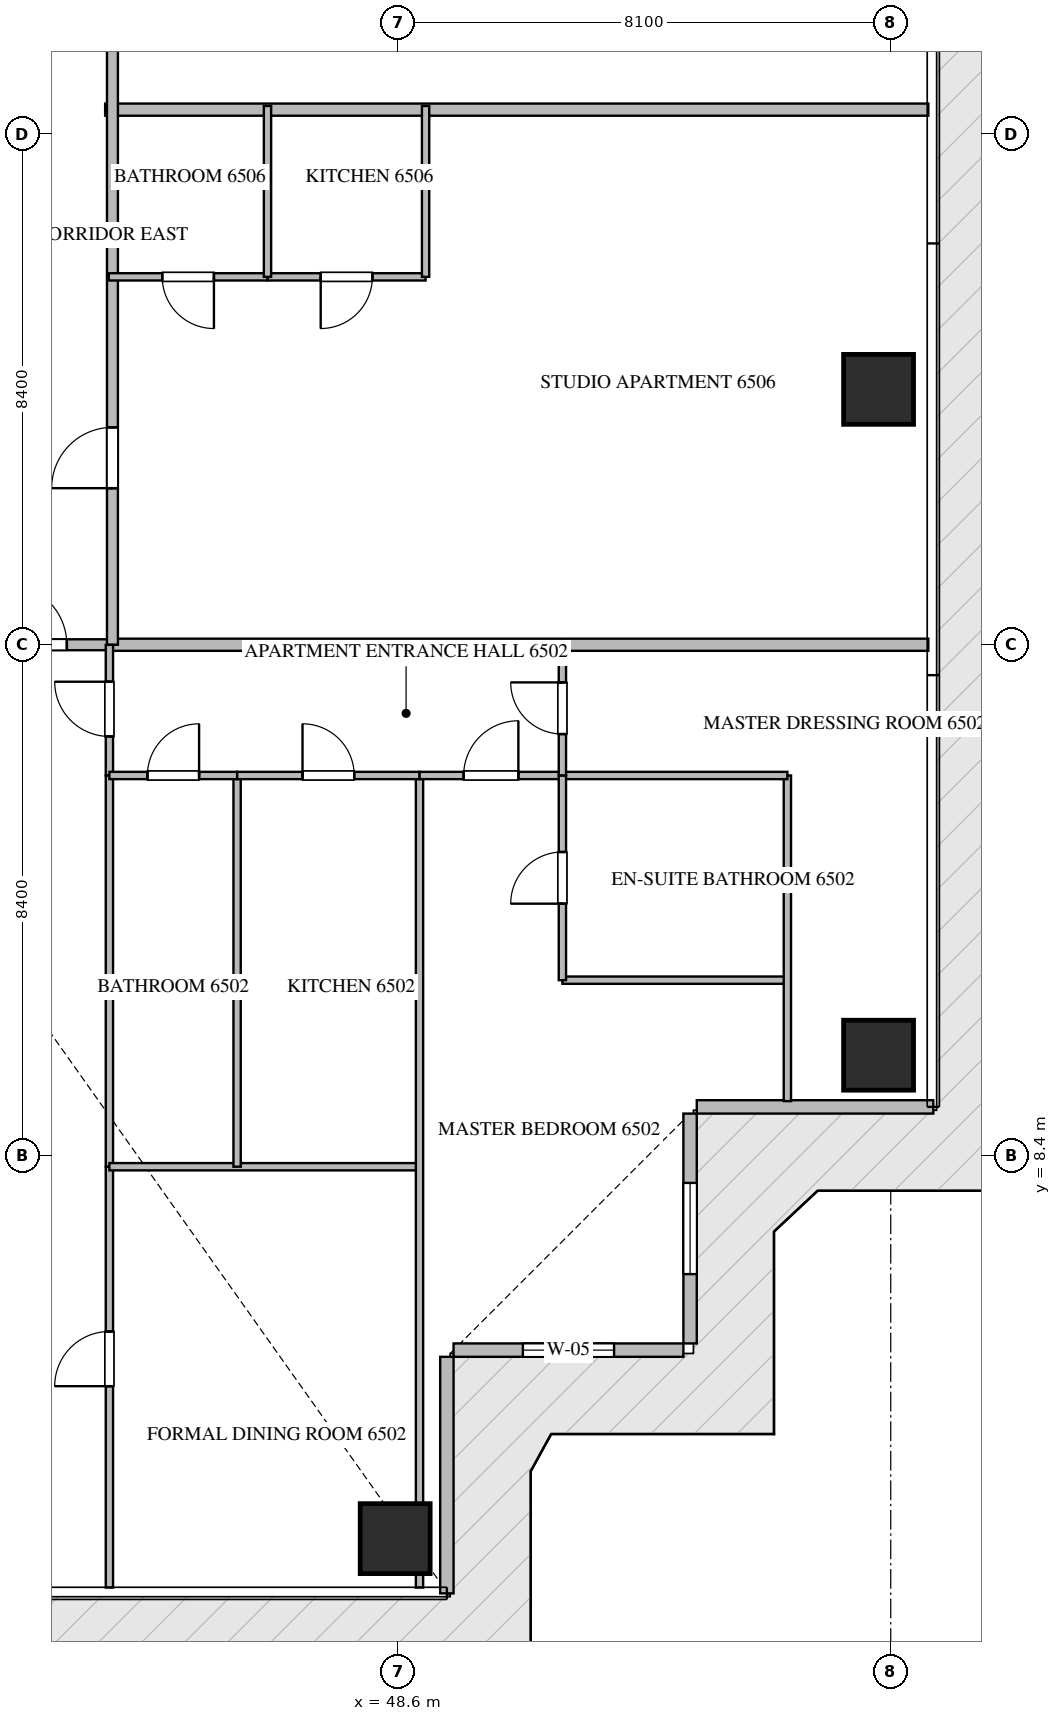
"""IFC4 building model, lengths in metres.
Left out: names, types, materials, properties, quantities, classifications, styles, units other than length and angle.
Written with IfcOpenShell. Run it as: python <this file> out.ifc"""

import sys

from ifc_helpers import new_model, si_unit, direction, frame, frame_2d, origin, origin_2d, place, context, subcontext, project, spatial, rectangle, extrude, source, transform, mapped, element, fill, save


model = new_model("IFC4")
c1 = context("Model", 3, precision=1e-05, world=origin(), true_north=direction((0.0, 1.0)))
c2 = subcontext(c1, "Body", "Model", "MODEL_VIEW")
j1 = project(units=[si_unit("LENGTHUNIT", "METRE"), si_unit("PLANEANGLEUNIT", "RADIAN")], contexts=[c1])
p1 = place(None, origin())
s1 = spatial("IfcSite", under=j1, at=p1, CompositionType="ELEMENT")
p2 = place(p1, origin())
s2 = spatial("IfcBuilding", under=s1, at=p2, CompositionType="ELEMENT")
p3 = place(p2, frame((0.0, 0.0, 260.5)))
s3 = spatial("IfcBuildingStorey", under=s2, at=p3, CompositionType="ELEMENT", Elevation=260.5)
m1 = source(origin(), c2, "Body", "SweptSolid", [
    extrude(rectangle(XDim=1.15, YDim=1.15, at=origin_2d()), origin(), (0.0, 0.0, 1.0), 3.85),
])
for number, where, z_axis, x_axis in (
    (1, (48.55, 2.1, -0.26), (0.0, 0.0, 1.0), (1.0, 0.0, 0.0)),
    (2, (56.5, 10.05, -0.26), (0.0, 0.0, 1.0), (1.0, 0.0, 0.0)),
    (3, (56.5, 21.0, -0.26), (0.0, 0.0, 1.0), (1.0, 0.0, 0.0)),
):
    element("IfcColumn", number, at=place(p3, frame(where, z_axis=z_axis, x_axis=x_axis)), inside=s3, PredefinedType="COLUMN", context=c2, shape_type="MappedRepresentation", body=[
        mapped(m1, transform((0.0, 0.0, 0.0), scale=1.0)),
    ])
p4 = place(p3, frame((49.4, 1.2, 0.0), z_axis=(0.0, 0.0, 1.0), x_axis=(0.0, 1.0, 0.0)))
e4 = element("IfcWall", 4, at=p4, inside=s3, PredefinedType="ELEMENTEDWALL", context=c2, shape_type="SweptSolid", body=[
    extrude(rectangle(XDim=3.89, YDim=0.22, at=frame_2d((1.945, 0.0))), origin(), (0.0, 0.0, 1.0), 3.575),
])
p5 = place(p3, frame((49.51, 5.2, 0.0), z_axis=(0.0, 0.0, 1.0), x_axis=(1.0, 0.0, 0.0)))
e5 = element("IfcWall", 5, at=p5, inside=s3, PredefinedType="ELEMENTEDWALL", context=c2, shape_type="SweptSolid", body=[
    extrude(rectangle(XDim=3.78, YDim=0.22, at=frame_2d((1.89, 0.0))), origin(), (0.0, 0.0, 1.0), 3.575),
])
p6 = place(p5, frame((1.14, 0.0, 0.65)))
e6 = element("IfcOpeningElement", 6, at=p6, cuts=e5, PredefinedType="OPENING", context=c2, shape_type="SweptSolid", body=[
    extrude(rectangle(XDim=1.5, YDim=2.25, at=frame_2d((0.75, 1.125))), frame((0.0, 0.12, 0.0), z_axis=(0.0, -1.0, 0.0), x_axis=(1.0, 0.0, 0.0)), (0.0, 0.0, 1.0), 0.24),
])
p7 = place(p3, frame((53.4, 5.31, 0.0), z_axis=(0.0, 0.0, 1.0), x_axis=(0.0, 1.0, 0.0)))
e7 = element("IfcWall", 7, at=p7, inside=s3, PredefinedType="ELEMENTEDWALL", context=c2, shape_type="SweptSolid", body=[
    extrude(rectangle(XDim=3.78, YDim=0.22, at=frame_2d((1.89, 0.0))), origin(), (0.0, 0.0, 1.0), 3.575),
])
p8 = place(p7, frame((1.14, 0.0, 0.65)))
e8 = element("IfcOpeningElement", 8, at=p8, cuts=e7, PredefinedType="OPENING", context=c2, shape_type="SweptSolid", body=[
    extrude(rectangle(XDim=1.5, YDim=2.25, at=frame_2d((0.75, 1.125))), frame((0.0, 0.12, 0.0), z_axis=(0.0, -1.0, 0.0), x_axis=(1.0, 0.0, 0.0)), (0.0, 0.0, 1.0), 0.24),
])
p9 = place(p3, frame((53.51, 9.2, 0.0), z_axis=(0.0, 0.0, 1.0), x_axis=(1.0, 0.0, 0.0)))
e9 = element("IfcWall", 9, at=p9, inside=s3, PredefinedType="ELEMENTEDWALL", context=c2, shape_type="SweptSolid", body=[
    extrude(rectangle(XDim=3.89, YDim=0.22, at=frame_2d((1.945, 0.0))), origin(), (0.0, 0.0, 1.0), 3.575),
])
p10 = place(p3, frame((43.78, 25.6, 0.0), z_axis=(0.0, 0.0, 1.0), x_axis=(1.0, 0.0, 0.0)))
e10 = element("IfcWall", 10, at=p10, inside=s3, PredefinedType="PARTITIONING", context=c2, shape_type="SweptSolid", body=[
    extrude(rectangle(XDim=13.538, YDim=0.2, at=frame_2d((6.769, 0.0))), origin(), (0.0, 0.0, 1.0), 3.59),
])
p11 = place(p3, frame((43.9, 16.8, 0.0), z_axis=(0.0, 0.0, 1.0), x_axis=(1.0, 0.0, 0.0)))
e11 = element("IfcWall", 11, at=p11, inside=s3, PredefinedType="PARTITIONING", context=c2, shape_type="SweptSolid", body=[
    extrude(rectangle(XDim=13.418, YDim=0.2, at=frame_2d((6.709, 0.0))), origin(), (0.0, 0.0, 1.0), 3.59),
])
p12 = place(p3, frame((41.402, 16.8, 0.0), z_axis=(0.0, 0.0, 1.0), x_axis=(1.0, 0.0, 0.0)))
e12 = element("IfcWall", 12, at=p12, inside=s3, PredefinedType="PARTITIONING", context=c2, shape_type="SweptSolid", body=[
    extrude(rectangle(XDim=2.496, YDim=0.18, at=frame_2d((1.248, 0.0))), origin(), (0.0, 0.0, 1.0), 3.59),
])
p13 = place(p12, frame((0.748, 0.0, 0.0)))
e13 = element("IfcOpeningElement", 13, at=p13, cuts=e12, PredefinedType="OPENING", context=c2, shape_type="SweptSolid", body=[
    extrude(rectangle(XDim=1.0, YDim=2.15, at=frame_2d((0.5, 1.075))), frame((0.0, 0.1, 0.0), z_axis=(0.0, -1.0, 0.0), x_axis=(1.0, 0.0, 0.0)), (0.0, 0.0, 1.0), 0.2),
])
p14 = place(p3, frame((43.9, 16.8, 0.0), z_axis=(0.0, 0.0, 1.0), x_axis=(0.0, 1.0, 0.0)))
e14 = element("IfcWall", 14, at=p14, inside=s3, PredefinedType="PARTITIONING", context=c2, shape_type="SweptSolid", body=[
    extrude(rectangle(XDim=16.8, YDim=0.18, at=frame_2d((8.4, 0.0))), origin(), (0.0, 0.0, 1.0), 3.59),
])
p15 = place(p14, frame((2.575, 0.0, 0.0)))
e15 = element("IfcOpeningElement", 15, at=p15, cuts=e14, PredefinedType="OPENING", context=c2, shape_type="SweptSolid", body=[
    extrude(rectangle(XDim=1.0, YDim=2.15, at=frame_2d((0.5, 1.075))), frame((0.0, 0.1, 0.0), z_axis=(0.0, -1.0, 0.0), x_axis=(1.0, 0.0, 0.0)), (0.0, 0.0, 1.0), 0.2),
])
p16 = place(p14, frame((10.997, 0.0, 0.0)))
e16 = element("IfcOpeningElement", 16, at=p16, cuts=e14, PredefinedType="OPENING", context=c2, shape_type="SweptSolid", body=[
    extrude(rectangle(XDim=1.0, YDim=2.15, at=frame_2d((0.5, 1.075))), frame((0.0, 0.1, 0.0), z_axis=(0.0, -1.0, 0.0), x_axis=(1.0, 0.0, 0.0)), (0.0, 0.0, 1.0), 0.2),
])
p17 = place(p3, frame((43.85, 14.65, 0.0), z_axis=(0.0, 0.0, 1.0), x_axis=(0.0, 1.0, 0.0)))
e17 = element("IfcWall", 17, at=p17, inside=s3, PredefinedType="PARTITIONING", context=c2, shape_type="SweptSolid", body=[
    extrude(rectangle(XDim=2.148, YDim=0.12, at=frame_2d((1.074, 0.0))), origin(), (0.0, 0.0, 1.0), 3.59),
])
p18 = place(p17, frame((0.642, 0.0, 0.0)))
e18 = element("IfcOpeningElement", 18, at=p18, cuts=e17, PredefinedType="OPENING", context=c2, shape_type="SweptSolid", body=[
    extrude(rectangle(XDim=0.9, YDim=2.1, at=frame_2d((0.45, 1.05))), frame((0.0, 0.07, 0.0), z_axis=(0.0, -1.0, 0.0), x_axis=(1.0, 0.0, 0.0)), (0.0, 0.0, 1.0), 0.14),
])
p19 = place(p3, frame((43.85, 1.295, 0.0), z_axis=(0.0, 0.0, 1.0), x_axis=(0.0, 1.0, 0.0)))
e19 = element("IfcWall", 19, at=p19, inside=s3, PredefinedType="PARTITIONING", context=c2, shape_type="SweptSolid", body=[
    extrude(rectangle(XDim=6.921, YDim=0.12, at=frame_2d((3.46, 0.0))), origin(), (0.0, 0.0, 1.0), 3.59),
])
p20 = place(p19, frame((3.312, 0.0, 0.0)))
e20 = element("IfcOpeningElement", 20, at=p20, cuts=e19, PredefinedType="OPENING", context=c2, shape_type="SweptSolid", body=[
    extrude(rectangle(XDim=0.9, YDim=2.1, at=frame_2d((0.45, 1.05))), frame((0.0, 0.07, 0.0), z_axis=(0.0, -1.0, 0.0), x_axis=(1.0, 0.0, 0.0)), (0.0, 0.0, 1.0), 0.14),
])
p21 = place(p3, frame((43.85, 8.218, 0.0), z_axis=(0.0, 0.0, 1.0), x_axis=(0.0, 1.0, 0.0)))
e21 = element("IfcWall", 21, at=p21, inside=s3, PredefinedType="PARTITIONING", context=c2, shape_type="SweptSolid", body=[
    extrude(rectangle(XDim=6.43, YDim=0.12, at=frame_2d((3.215, 0.0))), origin(), (0.0, 0.0, 1.0), 3.59),
])
p22 = place(p3, frame((43.85, 8.216, 0.0), z_axis=(0.0, 0.0, 1.0), x_axis=(1.0, 0.0, 0.0)))
e22 = element("IfcWall", 22, at=p22, inside=s3, PredefinedType="PARTITIONING", context=c2, shape_type="SweptSolid", body=[
    extrude(rectangle(XDim=5.1, YDim=0.12, at=frame_2d((2.55, 0.0))), origin(), (0.0, 0.0, 1.0), 3.59),
])
p23 = place(p3, frame((48.95, 1.295, 0.0), z_axis=(0.0, 0.0, 1.0), x_axis=(0.0, 1.0, 0.0)))
e23 = element("IfcWall", 23, at=p23, inside=s3, PredefinedType="PARTITIONING", context=c2, shape_type="SweptSolid", body=[
    extrude(rectangle(XDim=13.355, YDim=0.12, at=frame_2d((6.677, 0.0))), origin(), (0.0, 0.0, 1.0), 3.59),
])
p24 = place(p3, frame((45.95, 8.216, 0.0), z_axis=(0.0, 0.0, 1.0), x_axis=(0.0, 1.0, 0.0)))
e24 = element("IfcWall", 24, at=p24, inside=s3, PredefinedType="PARTITIONING", context=c2, shape_type="SweptSolid", body=[
    extrude(rectangle(XDim=6.434, YDim=0.12, at=frame_2d((3.217, 0.0))), origin(), (0.0, 0.0, 1.0), 3.59),
])
p25 = place(p3, frame((43.85, 14.65, 0.0), z_axis=(0.0, 0.0, 1.0), x_axis=(1.0, 0.0, 0.0)))
e25 = element("IfcWall", 25, at=p25, inside=s3, PredefinedType="PARTITIONING", context=c2, shape_type="SweptSolid", body=[
    extrude(rectangle(XDim=2.1, YDim=0.12, at=frame_2d((1.05, 0.0))), origin(), (0.0, 0.0, 1.0), 3.59),
])
p26 = place(p25, frame((0.625, 0.0, 0.0)))
e26 = element("IfcOpeningElement", 26, at=p26, cuts=e25, PredefinedType="OPENING", context=c2, shape_type="SweptSolid", body=[
    extrude(rectangle(XDim=0.85, YDim=2.1, at=frame_2d((0.425, 1.05))), frame((0.0, 0.07, 0.0), z_axis=(0.0, -1.0, 0.0), x_axis=(1.0, 0.0, 0.0)), (0.0, 0.0, 1.0), 0.14),
])
p27 = place(p3, frame((45.952, 14.65, 0.0), z_axis=(0.0, 0.0, 1.0), x_axis=(1.0, 0.0, 0.0)))
e27 = element("IfcWall", 27, at=p27, inside=s3, PredefinedType="PARTITIONING", context=c2, shape_type="SweptSolid", body=[
    extrude(rectangle(XDim=2.998, YDim=0.12, at=frame_2d((1.499, 0.0))), origin(), (0.0, 0.0, 1.0), 3.59),
])
p28 = place(p27, frame((1.074, 0.0, 0.0)))
e28 = element("IfcOpeningElement", 28, at=p28, cuts=e27, PredefinedType="OPENING", context=c2, shape_type="SweptSolid", body=[
    extrude(rectangle(XDim=0.85, YDim=2.1, at=frame_2d((0.425, 1.05))), frame((0.0, 0.07, 0.0), z_axis=(0.0, -1.0, 0.0), x_axis=(1.0, 0.0, 0.0)), (0.0, 0.0, 1.0), 0.14),
])
p29 = place(p3, frame((48.952, 14.65, 0.0), z_axis=(0.0, 0.0, 1.0), x_axis=(1.0, 0.0, 0.0)))
e29 = element("IfcWall", 29, at=p29, inside=s3, PredefinedType="PARTITIONING", context=c2, shape_type="SweptSolid", body=[
    extrude(rectangle(XDim=2.348, YDim=0.12, at=frame_2d((1.174, 0.0))), origin(), (0.0, 0.0, 1.0), 3.59),
])
p30 = place(p29, frame((0.724, 0.0, 0.0)))
e30 = element("IfcOpeningElement", 30, at=p30, cuts=e29, PredefinedType="OPENING", context=c2, shape_type="SweptSolid", body=[
    extrude(rectangle(XDim=0.9, YDim=2.1, at=frame_2d((0.45, 1.05))), frame((0.0, 0.07, 0.0), z_axis=(0.0, -1.0, 0.0), x_axis=(1.0, 0.0, 0.0)), (0.0, 0.0, 1.0), 0.14),
])
p31 = place(p3, frame((51.3, 11.284, 0.0), z_axis=(0.0, 0.0, 1.0), x_axis=(1.0, 0.0, 0.0)))
e31 = element("IfcWall", 31, at=p31, inside=s3, PredefinedType="PARTITIONING", context=c2, shape_type="SweptSolid", body=[
    extrude(rectangle(XDim=3.7, YDim=0.12, at=frame_2d((1.85, 0.0))), origin(), (0.0, 0.0, 1.0), 3.59),
])
p32 = place(p3, frame((55.0, 9.295, 0.0), z_axis=(0.0, 0.0, 1.0), x_axis=(0.0, 1.0, 0.0)))
e32 = element("IfcWall", 32, at=p32, inside=s3, PredefinedType="PARTITIONING", context=c2, shape_type="SweptSolid", body=[
    extrude(rectangle(XDim=5.355, YDim=0.12, at=frame_2d((2.677, 0.0))), origin(), (0.0, 0.0, 1.0), 3.59),
])
p33 = place(p3, frame((51.302, 14.65, 0.0), z_axis=(0.0, 0.0, 1.0), x_axis=(1.0, 0.0, 0.0)))
e33 = element("IfcWall", 33, at=p33, inside=s3, PredefinedType="PARTITIONING", context=c2, shape_type="SweptSolid", body=[
    extrude(rectangle(XDim=3.698, YDim=0.12, at=frame_2d((1.849, 0.0))), origin(), (0.0, 0.0, 1.0), 3.59),
])
p34 = place(p3, frame((51.3, 11.284, 0.0), z_axis=(0.0, 0.0, 1.0), x_axis=(0.0, 1.0, 0.0)))
e34 = element("IfcWall", 34, at=p34, inside=s3, PredefinedType="PARTITIONING", context=c2, shape_type="SweptSolid", body=[
    extrude(rectangle(XDim=3.366, YDim=0.12, at=frame_2d((1.683, 0.0))), origin(), (0.0, 0.0, 1.0), 3.59),
])
p35 = place(p34, frame((1.258, 0.0, 0.0)))
e35 = element("IfcOpeningElement", 35, at=p35, cuts=e34, PredefinedType="OPENING", context=c2, shape_type="SweptSolid", body=[
    extrude(rectangle(XDim=0.85, YDim=2.1, at=frame_2d((0.425, 1.05))), frame((0.0, 0.07, 0.0), z_axis=(0.0, -1.0, 0.0), x_axis=(1.0, 0.0, 0.0)), (0.0, 0.0, 1.0), 0.14),
])
p36 = place(p3, frame((51.3, 14.652, 0.0), z_axis=(0.0, 0.0, 1.0), x_axis=(0.0, 1.0, 0.0)))
e36 = element("IfcWall", 36, at=p36, inside=s3, PredefinedType="PARTITIONING", context=c2, shape_type="SweptSolid", body=[
    extrude(rectangle(XDim=2.208, YDim=0.12, at=frame_2d((1.104, 0.0))), origin(), (0.0, 0.0, 1.0), 3.59),
])
p37 = place(p36, frame((0.679, 0.0, 0.0)))
e37 = element("IfcOpeningElement", 37, at=p37, cuts=e36, PredefinedType="OPENING", context=c2, shape_type="SweptSolid", body=[
    extrude(rectangle(XDim=0.85, YDim=2.1, at=frame_2d((0.425, 1.05))), frame((0.0, 0.07, 0.0), z_axis=(0.0, -1.0, 0.0), x_axis=(1.0, 0.0, 0.0)), (0.0, 0.0, 1.0), 0.14),
])
p38 = place(p3, frame((49.05, 22.85, 0.0), z_axis=(0.0, 0.0, 1.0), x_axis=(-1.0, 0.0, 0.0)))
e38 = element("IfcWall", 38, at=p38, inside=s3, PredefinedType="PARTITIONING", context=c2, shape_type="SweptSolid", body=[
    extrude(rectangle(XDim=2.6, YDim=0.12, at=frame_2d((1.3, 0.0))), origin(), (0.0, 0.0, 1.0), 3.59),
])
p39 = place(p38, frame((0.875, 0.0, 0.0)))
e39 = element("IfcOpeningElement", 39, at=p39, cuts=e38, PredefinedType="OPENING", context=c2, shape_type="SweptSolid", body=[
    extrude(rectangle(XDim=0.85, YDim=2.1, at=frame_2d((0.425, 1.05))), frame((0.0, 0.07, 0.0), z_axis=(0.0, -1.0, 0.0), x_axis=(1.0, 0.0, 0.0)), (0.0, 0.0, 1.0), 0.14),
])
p40 = place(p3, frame((46.448, 22.85, 0.0), z_axis=(0.0, 0.0, 1.0), x_axis=(-1.0, 0.0, 0.0)))
e40 = element("IfcWall", 40, at=p40, inside=s3, PredefinedType="PARTITIONING", context=c2, shape_type="SweptSolid", body=[
    extrude(rectangle(XDim=2.608, YDim=0.12, at=frame_2d((1.304, 0.0))), origin(), (0.0, 0.0, 1.0), 3.59),
])
p41 = place(p40, frame((0.879, 0.0, 0.0)))
e41 = element("IfcOpeningElement", 41, at=p41, cuts=e40, PredefinedType="OPENING", context=c2, shape_type="SweptSolid", body=[
    extrude(rectangle(XDim=0.85, YDim=2.1, at=frame_2d((0.425, 1.05))), frame((0.0, 0.07, 0.0), z_axis=(0.0, -1.0, 0.0), x_axis=(1.0, 0.0, 0.0)), (0.0, 0.0, 1.0), 0.14),
])
for number, where, z_axis, x_axis in (
    (42, (46.45, 22.85, 0.0), (0.0, 0.0, 1.0), (0.0, 1.0, 0.0)),
    (43, (49.05, 22.85, 0.0), (0.0, 0.0, 1.0), (0.0, 1.0, 0.0)),
):
    element("IfcWall", number, at=place(p3, frame(where, z_axis=z_axis, x_axis=x_axis)), inside=s3, PredefinedType="PARTITIONING", context=c2, shape_type="SweptSolid", body=[
        extrude(rectangle(XDim=2.81, YDim=0.12, at=frame_2d((1.405, 0.0))), origin(), (0.0, 0.0, 1.0), 3.59),
    ])
m2 = source(origin(), c2, "Body", "SweptSolid", [
    extrude(rectangle(XDim=1.5, YDim=2.25, at=frame_2d((0.75, 1.125))), frame((0.0, 0.03, 0.0), z_axis=(0.0, -1.0, 0.0), x_axis=(1.0, 0.0, 0.0)), (0.0, 0.0, 1.0), 0.06),
])
p42 = place(p6, origin())
e44 = element("IfcWindow", 44, at=p42, inside=s3, PartitioningType="SINGLE_PANEL", PredefinedType="WINDOW", context=c2, shape_type="MappedRepresentation", body=[
    mapped(m2, transform((0.0, 0.0, 0.0), scale=1.0)),
])
fill(e6, e44)
p43 = place(p8, origin())
e45 = element("IfcWindow", 45, at=p43, inside=s3, PartitioningType="SINGLE_PANEL", PredefinedType="WINDOW", context=c2, shape_type="MappedRepresentation", body=[
    mapped(m2, transform((0.0, 0.0, 0.0), scale=1.0)),
])
fill(e8, e45)
m3 = source(origin(), c2, "Body", "SweptSolid", [
    extrude(rectangle(XDim=1.0, YDim=2.15, at=frame_2d((0.5, 1.075))), frame((0.0, 0.025, 0.0), z_axis=(0.0, -1.0, 0.0), x_axis=(1.0, 0.0, 0.0)), (0.0, 0.0, 1.0), 0.05),
])
p44 = place(p13, origin())
e46 = element("IfcDoor", 46, at=p44, inside=s3, OperationType="SINGLE_SWING_LEFT", PredefinedType="DOOR", context=c2, shape_type="MappedRepresentation", body=[
    mapped(m3, transform((0.0, 0.0, 0.0), scale=1.0)),
])
fill(e13, e46)
p45 = place(p15, origin())
e47 = element("IfcDoor", 47, at=p45, inside=s3, OperationType="SINGLE_SWING_LEFT", PredefinedType="DOOR", context=c2, shape_type="MappedRepresentation", body=[
    mapped(m3, transform((0.0, 0.0, 0.0), scale=1.0)),
])
fill(e15, e47)
m4 = source(origin(), c2, "Body", "SweptSolid", [
    extrude(rectangle(XDim=0.9, YDim=2.1, at=frame_2d((0.45, 1.05))), frame((0.0, 0.025, 0.0), z_axis=(0.0, -1.0, 0.0), x_axis=(1.0, 0.0, 0.0)), (0.0, 0.0, 1.0), 0.05),
])
p46 = place(p18, origin())
e48 = element("IfcDoor", 48, at=p46, inside=s3, OperationType="SINGLE_SWING_RIGHT", PredefinedType="DOOR", context=c2, shape_type="MappedRepresentation", body=[
    mapped(m4, transform((0.0, 0.0, 0.0), scale=1.0)),
])
fill(e18, e48)
p47 = place(p20, origin())
e49 = element("IfcDoor", 49, at=p47, inside=s3, OperationType="SINGLE_SWING_LEFT", PredefinedType="DOOR", context=c2, shape_type="MappedRepresentation", body=[
    mapped(m4, transform((0.0, 0.0, 0.0), scale=1.0)),
])
fill(e20, e49)
m5 = source(origin(), c2, "Body", "SweptSolid", [
    extrude(rectangle(XDim=0.85, YDim=2.1, at=frame_2d((0.425, 1.05))), frame((0.0, 0.025, 0.0), z_axis=(0.0, -1.0, 0.0), x_axis=(1.0, 0.0, 0.0)), (0.0, 0.0, 1.0), 0.05),
])
p48 = place(p26, origin())
e50 = element("IfcDoor", 50, at=p48, inside=s3, OperationType="SINGLE_SWING_RIGHT", PredefinedType="DOOR", context=c2, shape_type="MappedRepresentation", body=[
    mapped(m5, transform((0.0, 0.0, 0.0), scale=1.0)),
])
fill(e26, e50)
p49 = place(p28, origin())
e51 = element("IfcDoor", 51, at=p49, inside=s3, OperationType="SINGLE_SWING_LEFT", PredefinedType="DOOR", context=c2, shape_type="MappedRepresentation", body=[
    mapped(m5, transform((0.0, 0.0, 0.0), scale=1.0)),
])
fill(e28, e51)
p50 = place(p30, origin())
e52 = element("IfcDoor", 52, at=p50, inside=s3, OperationType="SINGLE_SWING_RIGHT", PredefinedType="DOOR", context=c2, shape_type="MappedRepresentation", body=[
    mapped(m4, transform((0.0, 0.0, 0.0), scale=1.0)),
])
fill(e30, e52)
p51 = place(p35, origin())
e53 = element("IfcDoor", 53, at=p51, inside=s3, OperationType="SINGLE_SWING_LEFT", PredefinedType="DOOR", context=c2, shape_type="MappedRepresentation", body=[
    mapped(m5, transform((0.0, 0.0, 0.0), scale=1.0)),
])
fill(e35, e53)
p52 = place(p37, origin())
e54 = element("IfcDoor", 54, at=p52, inside=s3, OperationType="SINGLE_SWING_RIGHT", PredefinedType="DOOR", context=c2, shape_type="MappedRepresentation", body=[
    mapped(m5, transform((0.0, 0.0, 0.0), scale=1.0)),
])
fill(e37, e54)
p53 = place(p39, origin())
e55 = element("IfcDoor", 55, at=p53, inside=s3, OperationType="SINGLE_SWING_RIGHT", PredefinedType="DOOR", context=c2, shape_type="MappedRepresentation", body=[
    mapped(m5, transform((0.0, 0.0, 0.0), scale=1.0)),
])
fill(e39, e55)
p54 = place(p41, origin())
e56 = element("IfcDoor", 56, at=p54, inside=s3, OperationType="SINGLE_SWING_LEFT", PredefinedType="DOOR", context=c2, shape_type="MappedRepresentation", body=[
    mapped(m5, transform((0.0, 0.0, 0.0), scale=1.0)),
])
fill(e41, e56)
save(model, sys.argv[1])
